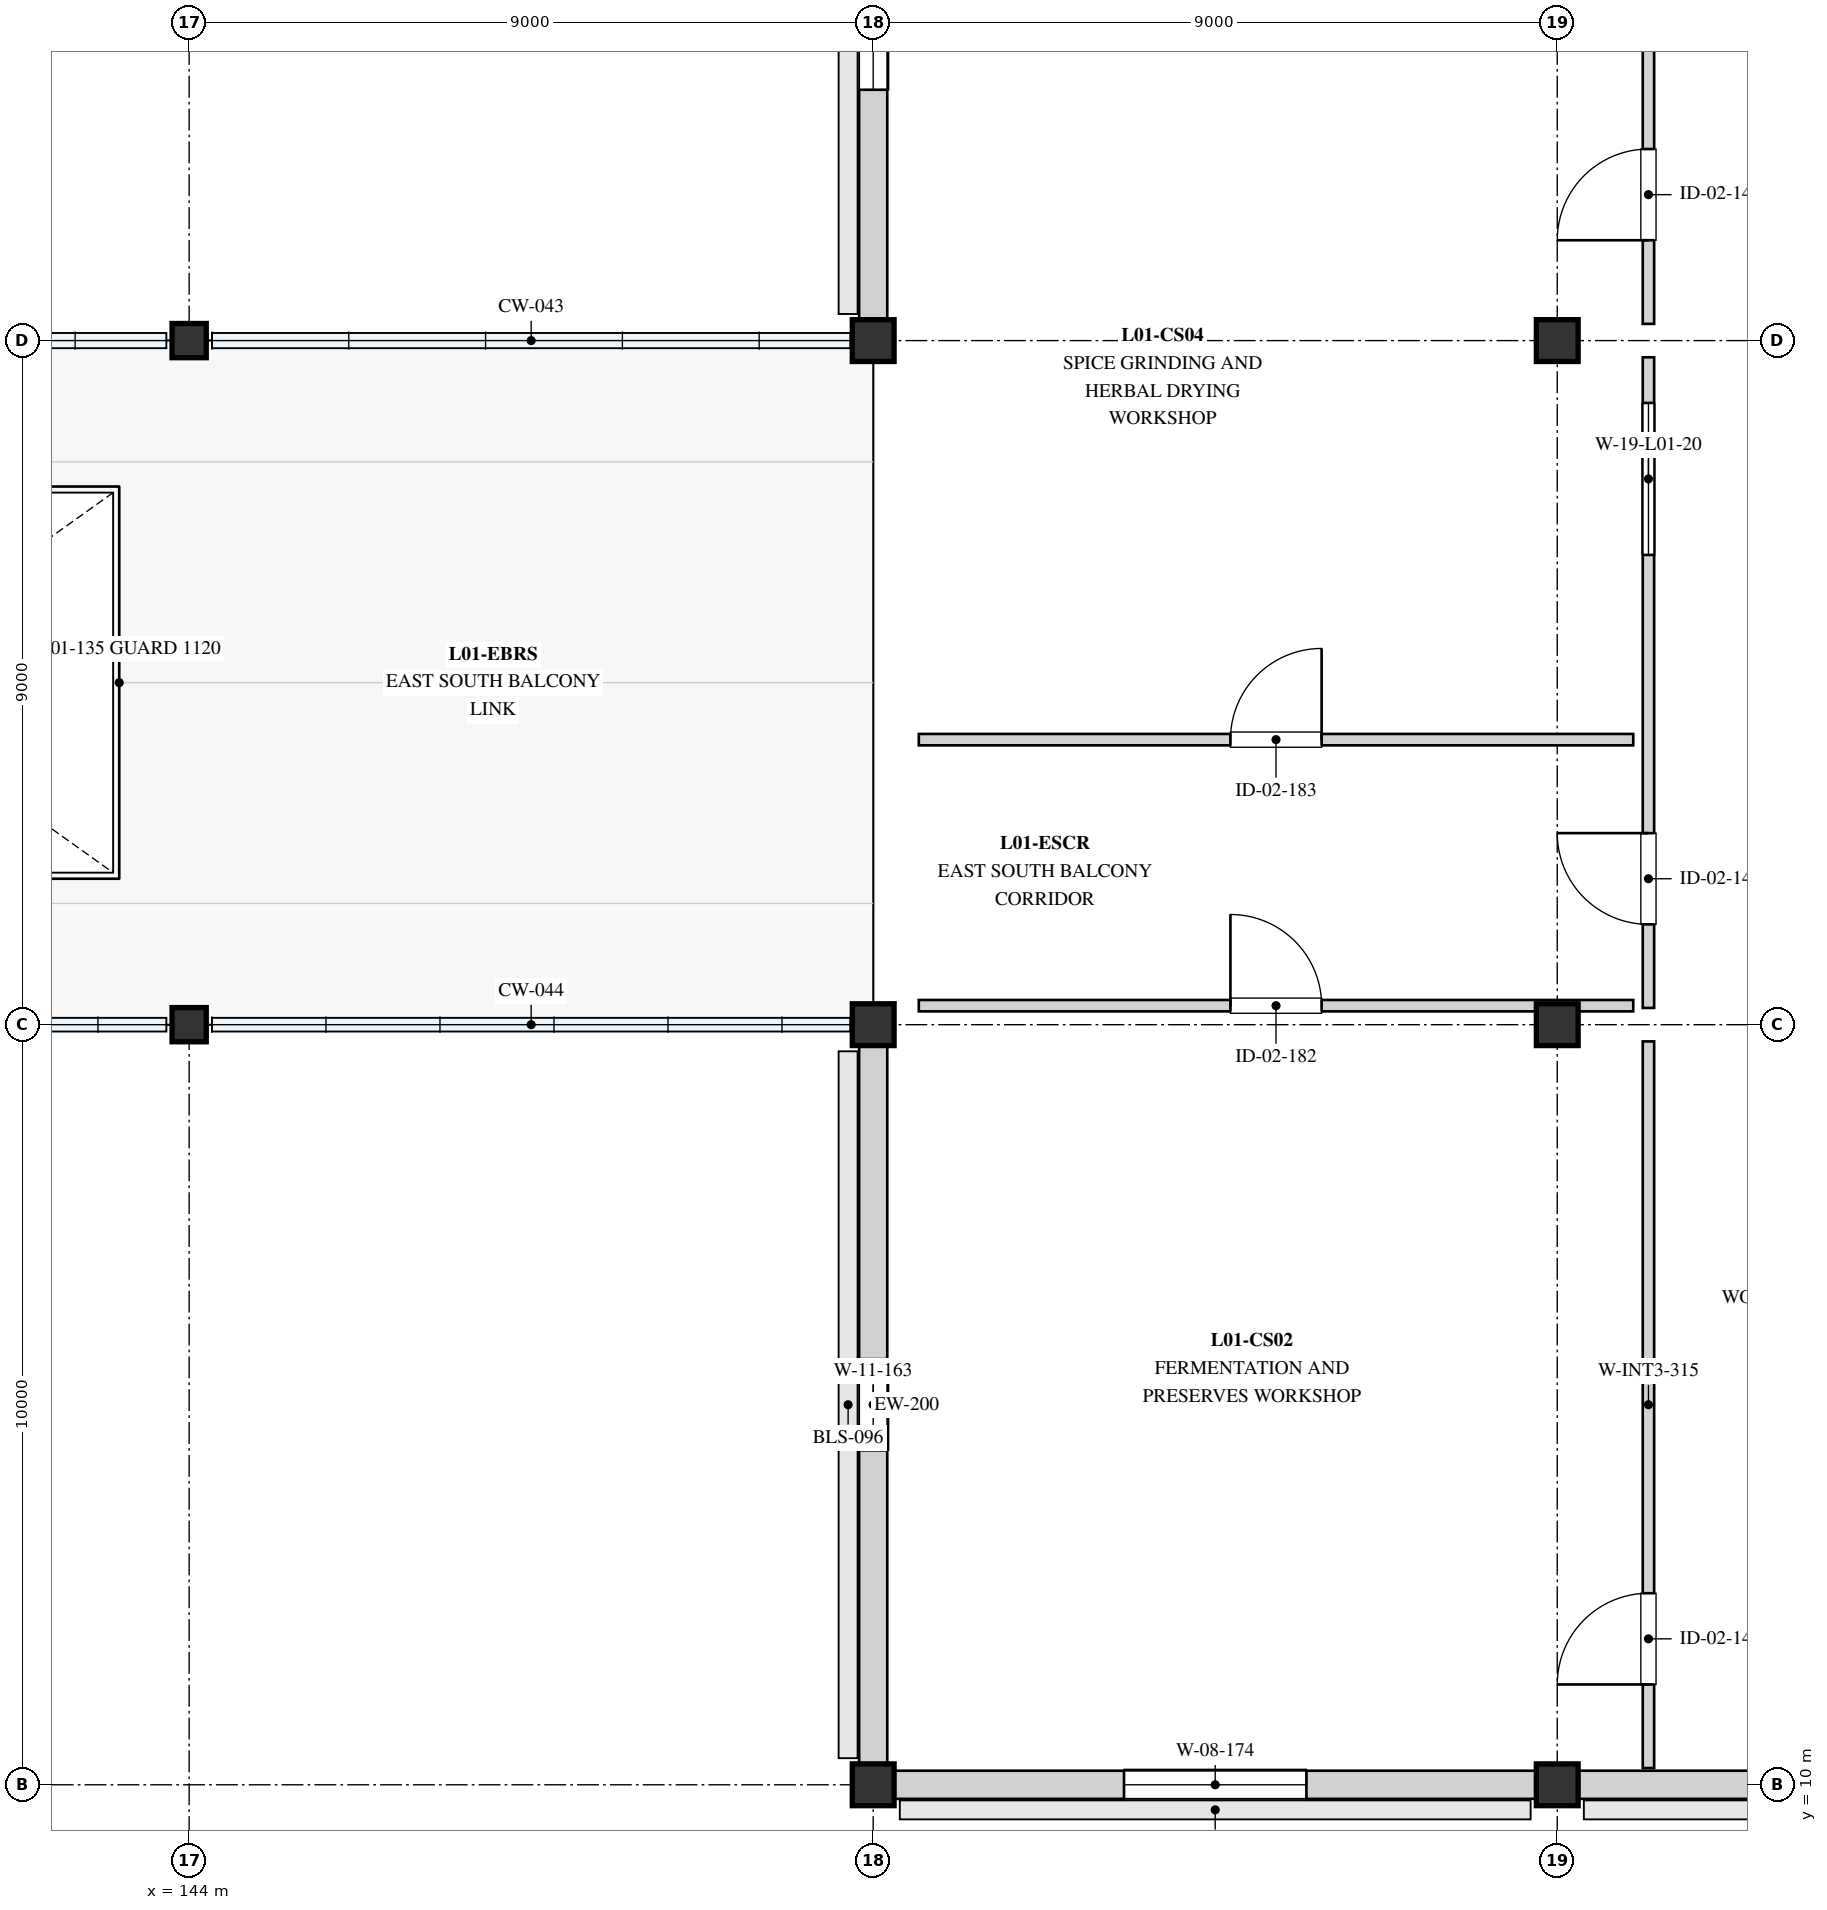
"""IFC4 building model, lengths in metres.
Left out: names, types, materials, properties, quantities, classifications, styles, units other than length and angle.
Written with IfcOpenShell. Run it as: python <this file> out.ifc"""

import sys

from ifc_helpers import new_model, si_unit, direction, frame, frame_2d, origin, origin_2d, place, context, subcontext, project, spatial, rectangle, extrude, element, fill, save


model = new_model("IFC4")
c1 = context("Model", 3, precision=1e-05, world=origin(), true_north=direction((0.0, 1.0)))
c2 = subcontext(c1, "Body", "Model", "MODEL_VIEW")
j1 = project(units=[si_unit("LENGTHUNIT", "METRE"), si_unit("PLANEANGLEUNIT", "RADIAN")], contexts=[c1])
p1 = place(None, origin())
s1 = spatial("IfcSite", under=j1, at=p1, CompositionType="ELEMENT")
p2 = place(p1, origin())
s2 = spatial("IfcBuilding", under=s1, at=p2, CompositionType="ELEMENT")
p3 = place(p2, frame((0.0, 0.0, 4.5)))
s3 = spatial("IfcBuildingStorey", under=s2, at=p3, CompositionType="ELEMENT", Elevation=4.5)
p4 = place(p3, frame((144.0, 20.0, 0.0), z_axis=(0.0, 0.0, 1.0), x_axis=(1.0, 0.0, 0.0)))
e1 = element("IfcColumn", 1, at=p4, inside=s3, PredefinedType="COLUMN", context=c2, shape_type="SweptSolid", body=[
    extrude(rectangle(XDim=0.45, YDim=0.45, at=origin_2d()), origin(), (0.0, 0.0, 1.0), 3.59),
])
p5 = place(p3, frame((144.0, 29.0, 0.0), z_axis=(0.0, 0.0, 1.0), x_axis=(1.0, 0.0, 0.0)))
e2 = element("IfcColumn", 2, at=p5, inside=s3, PredefinedType="COLUMN", context=c2, shape_type="SweptSolid", body=[
    extrude(rectangle(XDim=0.45, YDim=0.45, at=origin_2d()), origin(), (0.0, 0.0, 1.0), 5.59),
])
for number, where, z_axis, x_axis in (
    (3, (153.0, 10.0, 0.0), (0.0, 0.0, 1.0), (1.0, 0.0, 0.0)),
    (4, (153.0, 20.0, 0.0), (0.0, 0.0, 1.0), (1.0, 0.0, 0.0)),
    (5, (153.0, 29.0, 0.0), (0.0, 0.0, 1.0), (1.0, 0.0, 0.0)),
    (6, (162.0, 10.0, 0.0), (0.0, 0.0, 1.0), (1.0, 0.0, 0.0)),
    (7, (162.0, 20.0, 0.0), (0.0, 0.0, 1.0), (1.0, 0.0, 0.0)),
    (8, (162.0, 29.0, 0.0), (0.0, 0.0, 1.0), (1.0, 0.0, 0.0)),
):
    element("IfcColumn", number, at=place(p3, frame(where, z_axis=z_axis, x_axis=x_axis)), inside=s3, PredefinedType="COLUMN", context=c2, shape_type="SweptSolid", body=[
        extrude(rectangle(XDim=0.55, YDim=0.55, at=origin_2d()), origin(), (0.0, 0.0, 1.0), 3.9),
    ])
p6 = place(p3, frame((153.0, 10.0, 0.0), z_axis=(0.0, 0.0, 1.0), x_axis=(0.0, 1.0, 0.0)))
e9 = element("IfcWall", 9, at=p6, inside=s3, PredefinedType="STANDARD", context=c2, shape_type="SweptSolid", body=[
    extrude(rectangle(XDim=10.0, YDim=0.37, at=frame_2d((5.0, 0.0))), origin(), (0.0, 0.0, 1.0), 2.78),
])
p7 = place(p6, frame((4.4, 0.0, 0.79)))
e10 = element("IfcOpeningElement", 10, at=p7, cuts=e9, PredefinedType="OPENING", context=c2, shape_type="SweptSolid", body=[
    extrude(rectangle(XDim=1.2, YDim=1.8, at=frame_2d((0.6, 0.9))), frame((0.0, 0.195, 0.0), z_axis=(0.0, -1.0, 0.0), x_axis=(1.0, 0.0, 0.0)), (0.0, 0.0, 1.0), 0.39),
])
p8 = place(p3, frame((153.0, 29.0, 0.0), z_axis=(0.0, 0.0, 1.0), x_axis=(0.0, 1.0, 0.0)))
e11 = element("IfcWall", 11, at=p8, inside=s3, PredefinedType="STANDARD", context=c2, shape_type="SweptSolid", body=[
    extrude(rectangle(XDim=9.0, YDim=0.37, at=frame_2d((4.5, 0.0))), origin(), (0.0, 0.0, 1.0), 2.78),
])
p9 = place(p8, frame((3.3, 0.0, 0.59)))
e12 = element("IfcOpeningElement", 12, at=p9, cuts=e11, PredefinedType="OPENING", context=c2, shape_type="SweptSolid", body=[
    extrude(rectangle(XDim=2.4, YDim=2.0, at=frame_2d((1.2, 1.0))), frame((0.0, 0.195, 0.0), z_axis=(0.0, -1.0, 0.0), x_axis=(1.0, 0.0, 0.0)), (0.0, 0.0, 1.0), 0.39),
])
p10 = place(p3, frame((153.0, 10.0, 0.0), z_axis=(0.0, 0.0, 1.0), x_axis=(1.0, 0.0, 0.0)))
e13 = element("IfcWall", 13, at=p10, inside=s3, PredefinedType="STANDARD", context=c2, shape_type="SweptSolid", body=[
    extrude(rectangle(XDim=9.0, YDim=0.37, at=frame_2d((4.5, 0.0))), origin(), (0.0, 0.0, 1.0), 2.78),
])
p11 = place(p10, frame((3.3, 0.0, 0.59)))
e14 = element("IfcOpeningElement", 14, at=p11, cuts=e13, PredefinedType="OPENING", context=c2, shape_type="SweptSolid", body=[
    extrude(rectangle(XDim=2.4, YDim=2.0, at=frame_2d((1.2, 1.0))), frame((0.0, 0.195, 0.0), z_axis=(0.0, -1.0, 0.0), x_axis=(1.0, 0.0, 0.0)), (0.0, 0.0, 1.0), 0.39),
])
p12 = place(p3, frame((162.0, 10.0, 0.0), z_axis=(0.0, 0.0, 1.0), x_axis=(1.0, 0.0, 0.0)))
e15 = element("IfcWall", 15, at=p12, inside=s3, PredefinedType="STANDARD", context=c2, shape_type="SweptSolid", body=[
    extrude(rectangle(XDim=9.0, YDim=0.37, at=frame_2d((4.5, 0.0))), origin(), (0.0, 0.0, 1.0), 2.78),
])
p13 = place(p12, frame((3.3, 0.0, 0.59)))
e16 = element("IfcOpeningElement", 16, at=p13, cuts=e15, PredefinedType="OPENING", context=c2, shape_type="SweptSolid", body=[
    extrude(rectangle(XDim=2.4, YDim=2.0, at=frame_2d((1.2, 1.0))), frame((0.0, 0.195, 0.0), z_axis=(0.0, -1.0, 0.0), x_axis=(1.0, 0.0, 0.0)), (0.0, 0.0, 1.0), 0.39),
])
p14 = place(p3, frame((163.2, 10.22, 0.0), z_axis=(0.0, 0.0, 1.0), x_axis=(0.0, 1.0, 0.0)))
e17 = element("IfcWall", 17, at=p14, inside=s3, PredefinedType="PARTITIONING", context=c2, shape_type="SweptSolid", body=[
    extrude(rectangle(XDim=9.56, YDim=0.15, at=frame_2d((4.78, 0.0))), origin(), (0.0, 0.0, 1.0), 2.65),
])
p15 = place(p14, frame((1.1, 0.0, 0.0)))
e18 = element("IfcOpeningElement", 18, at=p15, cuts=e17, PredefinedType="OPENING", context=c2, shape_type="SweptSolid", body=[
    extrude(rectangle(XDim=1.2, YDim=2.15, at=frame_2d((0.6, 1.075))), frame((0.0, 0.085, 0.0), z_axis=(0.0, -1.0, 0.0), x_axis=(1.0, 0.0, 0.0)), (0.0, 0.0, 1.0), 0.17),
])
p16 = place(p3, frame((163.2, 20.22, 0.0), z_axis=(0.0, 0.0, 1.0), x_axis=(0.0, 1.0, 0.0)))
e19 = element("IfcWall", 19, at=p16, inside=s3, PredefinedType="PARTITIONING", context=c2, shape_type="SweptSolid", body=[
    extrude(rectangle(XDim=8.56, YDim=0.15, at=frame_2d((4.28, 0.0))), origin(), (0.0, 0.0, 1.0), 2.65),
])
p17 = place(p16, frame((1.1, 0.0, 0.0)))
e20 = element("IfcOpeningElement", 20, at=p17, cuts=e19, PredefinedType="OPENING", context=c2, shape_type="SweptSolid", body=[
    extrude(rectangle(XDim=1.2, YDim=2.15, at=frame_2d((0.6, 1.075))), frame((0.0, 0.085, 0.0), z_axis=(0.0, -1.0, 0.0), x_axis=(1.0, 0.0, 0.0)), (0.0, 0.0, 1.0), 0.17),
])
p18 = place(p16, frame((5.96, 0.0, 1.05)))
e21 = element("IfcOpeningElement", 21, at=p18, cuts=e19, PredefinedType="OPENING", context=c2, shape_type="SweptSolid", body=[
    extrude(rectangle(XDim=2.0, YDim=1.35, at=frame_2d((1.0, 0.675))), frame((0.0, 0.085, 0.0), z_axis=(0.0, -1.0, 0.0), x_axis=(1.0, 0.0, 0.0)), (0.0, 0.0, 1.0), 0.17),
])
p19 = place(p3, frame((163.2, 29.22, 0.0), z_axis=(0.0, 0.0, 1.0), x_axis=(0.0, 1.0, 0.0)))
e22 = element("IfcWall", 22, at=p19, inside=s3, PredefinedType="PARTITIONING", context=c2, shape_type="SweptSolid", body=[
    extrude(rectangle(XDim=8.56, YDim=0.15, at=frame_2d((4.28, 0.0))), origin(), (0.0, 0.0, 1.0), 2.65),
])
p20 = place(p19, frame((1.1, 0.0, 0.0)))
e23 = element("IfcOpeningElement", 23, at=p20, cuts=e22, PredefinedType="OPENING", context=c2, shape_type="SweptSolid", body=[
    extrude(rectangle(XDim=1.2, YDim=2.15, at=frame_2d((0.6, 1.075))), frame((0.0, 0.085, 0.0), z_axis=(0.0, -1.0, 0.0), x_axis=(1.0, 0.0, 0.0)), (0.0, 0.0, 1.0), 0.17),
])
p21 = place(p19, frame((5.96, 0.0, 1.05)))
e24 = element("IfcOpeningElement", 24, at=p21, cuts=e22, PredefinedType="OPENING", context=c2, shape_type="SweptSolid", body=[
    extrude(rectangle(XDim=2.0, YDim=1.35, at=frame_2d((1.0, 0.675))), frame((0.0, 0.085, 0.0), z_axis=(0.0, -1.0, 0.0), x_axis=(1.0, 0.0, 0.0)), (0.0, 0.0, 1.0), 0.17),
])
p22 = place(p3, frame((153.6, 20.25, 0.0), z_axis=(0.0, 0.0, 1.0), x_axis=(1.0, 0.0, 0.0)))
e25 = element("IfcWall", 25, at=p22, inside=s3, PredefinedType="PARTITIONING", context=c2, shape_type="SweptSolid", body=[
    extrude(rectangle(XDim=9.4, YDim=0.15, at=frame_2d((4.7, 0.0))), origin(), (0.0, 0.0, 1.0), 2.65),
])
p23 = place(p22, frame((4.1, 0.0, 0.0)))
e26 = element("IfcOpeningElement", 26, at=p23, cuts=e25, PredefinedType="OPENING", context=c2, shape_type="SweptSolid", body=[
    extrude(rectangle(XDim=1.2, YDim=2.15, at=frame_2d((0.6, 1.075))), frame((0.0, 0.085, 0.0), z_axis=(0.0, -1.0, 0.0), x_axis=(1.0, 0.0, 0.0)), (0.0, 0.0, 1.0), 0.17),
])
p24 = place(p3, frame((153.6, 23.75, 0.0), z_axis=(0.0, 0.0, 1.0), x_axis=(1.0, 0.0, 0.0)))
e27 = element("IfcWall", 27, at=p24, inside=s3, PredefinedType="PARTITIONING", context=c2, shape_type="SweptSolid", body=[
    extrude(rectangle(XDim=9.4, YDim=0.15, at=frame_2d((4.7, 0.0))), origin(), (0.0, 0.0, 1.0), 2.65),
])
p25 = place(p24, frame((4.1, 0.0, 0.0)))
e28 = element("IfcOpeningElement", 28, at=p25, cuts=e27, PredefinedType="OPENING", context=c2, shape_type="SweptSolid", body=[
    extrude(rectangle(XDim=1.2, YDim=2.15, at=frame_2d((0.6, 1.075))), frame((0.0, 0.085, 0.0), z_axis=(0.0, -1.0, 0.0), x_axis=(1.0, 0.0, 0.0)), (0.0, 0.0, 1.0), 0.17),
])
p26 = place(p7, origin())
e29 = element("IfcWindow", 29, at=p26, inside=s3, PartitioningType="SINGLE_PANEL", PredefinedType="WINDOW", context=c2, shape_type="SweptSolid", body=[
    extrude(rectangle(XDim=1.2, YDim=1.8, at=frame_2d((0.6, 0.9))), frame((0.0, 0.03, 0.0), z_axis=(0.0, -1.0, 0.0), x_axis=(1.0, 0.0, 0.0)), (0.0, 0.0, 1.0), 0.06),
])
fill(e10, e29)
p27 = place(p9, origin())
e30 = element("IfcWindow", 30, at=p27, inside=s3, PartitioningType="SINGLE_PANEL", PredefinedType="WINDOW", context=c2, shape_type="SweptSolid", body=[
    extrude(rectangle(XDim=2.4, YDim=2.0, at=frame_2d((1.2, 1.0))), frame((0.0, 0.03, 0.0), z_axis=(0.0, -1.0, 0.0), x_axis=(1.0, 0.0, 0.0)), (0.0, 0.0, 1.0), 0.06),
])
fill(e12, e30)
p28 = place(p11, origin())
e31 = element("IfcWindow", 31, at=p28, inside=s3, PartitioningType="SINGLE_PANEL", PredefinedType="WINDOW", context=c2, shape_type="SweptSolid", body=[
    extrude(rectangle(XDim=2.4, YDim=2.0, at=frame_2d((1.2, 1.0))), frame((0.0, 0.03, 0.0), z_axis=(0.0, -1.0, 0.0), x_axis=(1.0, 0.0, 0.0)), (0.0, 0.0, 1.0), 0.06),
])
fill(e14, e31)
p29 = place(p15, origin())
e32 = element("IfcDoor", 32, at=p29, inside=s3, OperationType="SINGLE_SWING_LEFT", PredefinedType="DOOR", context=c2, shape_type="SweptSolid", body=[
    extrude(rectangle(XDim=1.2, YDim=2.15, at=frame_2d((0.6, 1.075))), frame((0.0, 0.025, 0.0), z_axis=(0.0, -1.0, 0.0), x_axis=(1.0, 0.0, 0.0)), (0.0, 0.0, 1.0), 0.05),
])
fill(e18, e32)
p30 = place(p17, origin())
e33 = element("IfcDoor", 33, at=p30, inside=s3, OperationType="SINGLE_SWING_RIGHT", PredefinedType="DOOR", context=c2, shape_type="SweptSolid", body=[
    extrude(rectangle(XDim=1.2, YDim=2.15, at=frame_2d((0.6, 1.075))), frame((0.0, 0.025, 0.0), z_axis=(0.0, -1.0, 0.0), x_axis=(1.0, 0.0, 0.0)), (0.0, 0.0, 1.0), 0.05),
])
fill(e20, e33)
p31 = place(p18, origin())
e34 = element("IfcWindow", 34, at=p31, inside=s3, PartitioningType="SINGLE_PANEL", PredefinedType="WINDOW", context=c2, shape_type="SweptSolid", body=[
    extrude(rectangle(XDim=2.0, YDim=1.35, at=frame_2d((1.0, 0.675))), frame((0.0, 0.03, 0.0), z_axis=(0.0, -1.0, 0.0), x_axis=(1.0, 0.0, 0.0)), (0.0, 0.0, 1.0), 0.06),
])
fill(e21, e34)
p32 = place(p20, origin())
e35 = element("IfcDoor", 35, at=p32, inside=s3, OperationType="SINGLE_SWING_LEFT", PredefinedType="DOOR", context=c2, shape_type="SweptSolid", body=[
    extrude(rectangle(XDim=1.2, YDim=2.15, at=frame_2d((0.6, 1.075))), frame((0.0, 0.025, 0.0), z_axis=(0.0, -1.0, 0.0), x_axis=(1.0, 0.0, 0.0)), (0.0, 0.0, 1.0), 0.05),
])
fill(e23, e35)
p33 = place(p23, origin())
e36 = element("IfcDoor", 36, at=p33, inside=s3, OperationType="SINGLE_SWING_LEFT", PredefinedType="DOOR", context=c2, shape_type="SweptSolid", body=[
    extrude(rectangle(XDim=1.2, YDim=2.15, at=frame_2d((0.6, 1.075))), frame((0.0, 0.025, 0.0), z_axis=(0.0, -1.0, 0.0), x_axis=(1.0, 0.0, 0.0)), (0.0, 0.0, 1.0), 0.05),
])
fill(e26, e36)
p34 = place(p25, origin())
e37 = element("IfcDoor", 37, at=p34, inside=s3, OperationType="SINGLE_SWING_RIGHT", PredefinedType="DOOR", context=c2, shape_type="SweptSolid", body=[
    extrude(rectangle(XDim=1.2, YDim=2.15, at=frame_2d((0.6, 1.075))), frame((0.0, 0.025, 0.0), z_axis=(0.0, -1.0, 0.0), x_axis=(1.0, 0.0, 0.0)), (0.0, 0.0, 1.0), 0.05),
])
fill(e28, e37)
save(model, sys.argv[1])
